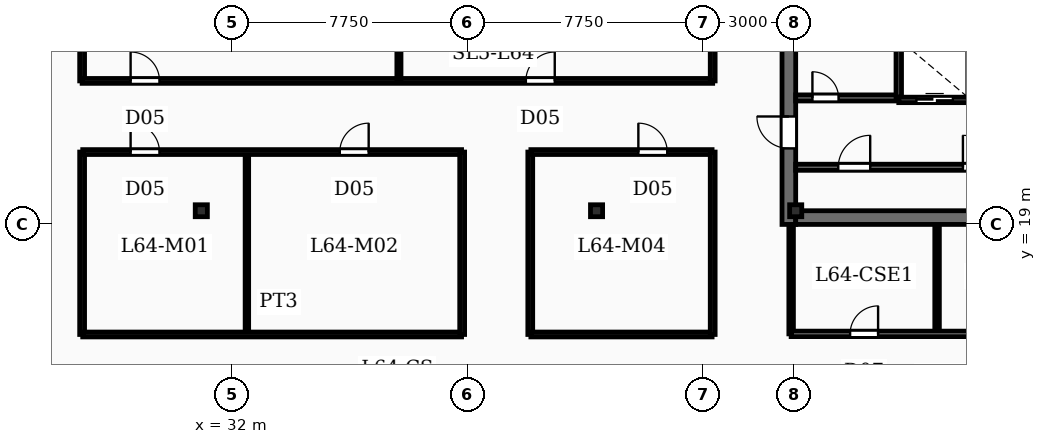
"""IFC4 building model, lengths in metres.
Left out: names, types, materials, properties, quantities, classifications, styles, units other than length and angle.
Written with IfcOpenShell. Run it as: python <this file> out.ifc"""

import sys

from ifc_helpers import new_model, si_unit, direction, frame, frame_2d, origin, origin_2d, place, context, subcontext, project, spatial, rectangle, i_section, extrude, element, fill, save


model = new_model("IFC4")
c1 = context("Model", 3, precision=1e-05, world=origin(), true_north=direction((0.0, 1.0)))
c2 = subcontext(c1, "Body", "Model", "MODEL_VIEW")
j1 = project(units=[si_unit("LENGTHUNIT", "METRE"), si_unit("PLANEANGLEUNIT", "RADIAN")], contexts=[c1])
p1 = place(None, origin())
s1 = spatial("IfcSite", under=j1, at=p1, CompositionType="ELEMENT")
p2 = place(p1, origin())
s2 = spatial("IfcBuilding", under=s1, at=p2, CompositionType="ELEMENT")
p3 = place(p2, frame((0.0, 0.0, 262.2)))
s3 = spatial("IfcBuildingStorey", under=s2, at=p3, CompositionType="ELEMENT", Elevation=262.2)
p4 = place(p3, frame((50.325, 19.0, -0.27), z_axis=(0.0, 0.0, 1.0), x_axis=(0.0, 1.0, 0.0)))
e1 = element("IfcWall", 1, at=p4, inside=s3, PredefinedType="SHEAR", context=c2, shape_type="SweptSolid", body=[
    extrude(rectangle(XDim=20.8, YDim=0.45, at=frame_2d((10.4, 0.0))), origin(), (0.0, 0.0, 1.0), 3.75),
])
p5 = place(p4, frame((2.5, 0.0, 0.27)))
e2 = element("IfcOpeningElement", 2, at=p5, cuts=e1, PredefinedType="OPENING", context=c2, shape_type="SweptSolid", body=[
    extrude(rectangle(XDim=1.05, YDim=2.15, at=frame_2d((0.525, 1.075))), frame((0.0, 0.235, 0.0), z_axis=(0.0, -1.0, 0.0), x_axis=(1.0, 0.0, 0.0)), (0.0, 0.0, 1.0), 0.47),
])
p6 = place(p4, frame((8.65, 0.0, 0.27)))
e3 = element("IfcOpeningElement", 3, at=p6, cuts=e1, PredefinedType="OPENING", context=c2, shape_type="SweptSolid", body=[
    extrude(rectangle(XDim=1.05, YDim=2.15, at=frame_2d((0.525, 1.075))), frame((0.0, 0.235, 0.0), z_axis=(0.0, -1.0, 0.0), x_axis=(1.0, 0.0, 0.0)), (0.0, 0.0, 1.0), 0.47),
])
p7 = place(p4, frame((14.62, 0.0, 0.27)))
e4 = element("IfcOpeningElement", 4, at=p7, cuts=e1, PredefinedType="OPENING", context=c2, shape_type="SweptSolid", body=[
    extrude(rectangle(XDim=1.1, YDim=2.15, at=frame_2d((0.55, 1.075))), frame((0.0, 0.235, 0.0), z_axis=(0.0, -1.0, 0.0), x_axis=(1.0, 0.0, 0.0)), (0.0, 0.0, 1.0), 0.47),
])
p8 = place(p3, frame((50.55, 19.225, -0.27), z_axis=(0.0, 0.0, 1.0), x_axis=(1.0, 0.0, 0.0)))
e5 = element("IfcWall", 5, at=p8, inside=s3, PredefinedType="SHEAR", context=c2, shape_type="SweptSolid", body=[
    extrude(rectangle(XDim=9.8, YDim=0.45, at=frame_2d((4.9, 0.0))), origin(), (0.0, 0.0, 1.0), 3.75),
])
for number, where, z_axis, x_axis in (
    (6, (50.55, 19.45, -0.27), (0.0, 0.0, 1.0), (1.0, 0.0, 0.0)),
    (7, (31.0, 19.45, -0.27), (0.0, 0.0, 1.0), (1.0, 0.0, 0.0)),
    (8, (44.0, 19.45, -0.27), (0.0, 0.0, 1.0), (1.0, 0.0, 0.0)),
):
    element("IfcColumn", number, at=place(p3, frame(where, z_axis=z_axis, x_axis=x_axis)), inside=s3, PredefinedType="COLUMN", context=c2, shape_type="SweptSolid", body=[
        extrude(i_section(OverallWidth=0.399, OverallDepth=0.393, WebThickness=0.023, FlangeThickness=0.037, FilletRadius=0.02, at=origin_2d()), origin(), (0.0, 0.0, 1.0), 3.75),
    ])
p9 = place(p3, frame((53.94, 23.095, 0.0), z_axis=(0.0, 0.0, 1.0), x_axis=(1.0, 0.0, 0.0)))
e9 = element("IfcWall", 9, at=p9, inside=s3, PredefinedType="SOLIDWALL", context=c2, shape_type="SweptSolid", body=[
    extrude(rectangle(XDim=2.5, YDim=0.18, at=frame_2d((1.25, 0.0))), origin(), (0.0, 0.0, 1.0), 3.48),
])
p10 = place(p9, frame((0.58, 0.0, 0.0)))
e10 = element("IfcOpeningElement", 10, at=p10, cuts=e9, PredefinedType="OPENING", context=c2, shape_type="SweptSolid", body=[
    extrude(rectangle(XDim=1.2, YDim=2.2, at=frame_2d((0.6, 1.1))), frame((0.0, 0.1, 0.0), z_axis=(0.0, -1.0, 0.0), x_axis=(1.0, 0.0, 0.0)), (0.0, 0.0, 1.0), 0.2),
])
p11 = place(p3, frame((53.94, 23.185, 0.0), z_axis=(0.0, 0.0, 1.0), x_axis=(0.0, 1.0, 0.0)))
e11 = element("IfcWall", 11, at=p11, inside=s3, PredefinedType="SOLIDWALL", context=c2, shape_type="SweptSolid", body=[
    extrude(rectangle(XDim=1.83, YDim=0.18, at=frame_2d((0.915, 0.0))), origin(), (0.0, 0.0, 1.0), 3.48),
])
p12 = place(p3, frame((50.55, 20.88, 0.0), z_axis=(0.0, 0.0, 1.0), x_axis=(1.0, 0.0, 0.0)))
e12 = element("IfcWall", 12, at=p12, inside=s3, PredefinedType="SOLIDWALL", context=c2, shape_type="SweptSolid", body=[
    extrude(rectangle(XDim=9.8, YDim=0.2, at=frame_2d((4.9, 0.0))), origin(), (0.0, 0.0, 1.0), 2.54),
])
p13 = place(p12, frame((1.4, 0.0, 0.0)))
e13 = element("IfcOpeningElement", 13, at=p13, cuts=e12, PredefinedType="OPENING", context=c2, shape_type="SweptSolid", body=[
    extrude(rectangle(XDim=1.05, YDim=2.15, at=frame_2d((0.525, 1.075))), frame((0.0, 0.11, 0.0), z_axis=(0.0, -1.0, 0.0), x_axis=(1.0, 0.0, 0.0)), (0.0, 0.0, 1.0), 0.22),
])
p14 = place(p12, frame((5.5, 0.0, 0.0)))
e14 = element("IfcOpeningElement", 14, at=p14, cuts=e12, PredefinedType="OPENING", context=c2, shape_type="SweptSolid", body=[
    extrude(rectangle(XDim=1.05, YDim=2.15, at=frame_2d((0.525, 1.075))), frame((0.0, 0.11, 0.0), z_axis=(0.0, -1.0, 0.0), x_axis=(1.0, 0.0, 0.0)), (0.0, 0.0, 1.0), 0.22),
])
p15 = place(p3, frame((50.55, 23.16, 0.0), z_axis=(0.0, 0.0, 1.0), x_axis=(1.0, 0.0, 0.0)))
e15 = element("IfcWall", 15, at=p15, inside=s3, PredefinedType="SOLIDWALL", context=c2, shape_type="SweptSolid", body=[
    extrude(rectangle(XDim=3.33, YDim=0.2, at=frame_2d((1.665, 0.0))), origin(), (0.0, 0.0, 1.0), 2.54),
])
p16 = place(p15, frame((0.55, 0.0, 0.0)))
e16 = element("IfcOpeningElement", 16, at=p16, cuts=e15, PredefinedType="OPENING", context=c2, shape_type="SweptSolid", body=[
    extrude(rectangle(XDim=0.86, YDim=2.05, at=frame_2d((0.43, 1.025))), frame((0.0, 0.11, 0.0), z_axis=(0.0, -1.0, 0.0), x_axis=(1.0, 0.0, 0.0)), (0.0, 0.0, 1.0), 0.22),
])
p17 = place(p3, frame((55.2, 15.4, 0.0), z_axis=(0.0, 0.0, 1.0), x_axis=(0.0, 1.0, 0.0)))
e17 = element("IfcWall", 17, at=p17, inside=s3, PredefinedType="PARTITIONING", context=c2, shape_type="SweptSolid", body=[
    extrude(rectangle(XDim=3.58, YDim=0.15, at=frame_2d((1.79, 0.0))), origin(), (0.0, 0.0, 1.0), 2.54),
])
p18 = place(p3, frame((50.4, 15.4, 0.0), z_axis=(0.0, 0.0, 1.0), x_axis=(1.0, 0.0, 0.0)))
e18 = element("IfcWall", 18, at=p18, inside=s3, PredefinedType="SOLIDWALL", context=c2, shape_type="SweptSolid", body=[
    extrude(rectangle(XDim=10.0, YDim=0.18, at=frame_2d((5.0, 0.0))), origin(), (0.0, 0.0, 1.0), 2.54),
])
p19 = place(p18, frame((1.94, 0.0, 0.0)))
e19 = element("IfcOpeningElement", 19, at=p19, cuts=e18, PredefinedType="OPENING", context=c2, shape_type="SweptSolid", body=[
    extrude(rectangle(XDim=0.92, YDim=2.1, at=frame_2d((0.46, 1.05))), frame((0.0, 0.1, 0.0), z_axis=(0.0, -1.0, 0.0), x_axis=(1.0, 0.0, 0.0)), (0.0, 0.0, 1.0), 0.2),
])
p20 = place(p18, frame((6.97, 0.0, 0.0)))
e20 = element("IfcOpeningElement", 20, at=p20, cuts=e18, PredefinedType="OPENING", context=c2, shape_type="SweptSolid", body=[
    extrude(rectangle(XDim=0.86, YDim=2.05, at=frame_2d((0.43, 1.025))), frame((0.0, 0.1, 0.0), z_axis=(0.0, -1.0, 0.0), x_axis=(1.0, 0.0, 0.0)), (0.0, 0.0, 1.0), 0.2),
])
p21 = place(p3, frame((50.4, 15.4, 0.0), z_axis=(0.0, 0.0, 1.0), x_axis=(0.0, 1.0, 0.0)))
e21 = element("IfcWall", 21, at=p21, inside=s3, PredefinedType="PARTITIONING", context=c2, shape_type="SweptSolid", body=[
    extrude(rectangle(XDim=3.58, YDim=0.15, at=frame_2d((1.79, 0.0))), origin(), (0.0, 0.0, 1.0), 2.54),
])
p22 = place(p3, frame((37.5, 23.72, 0.0), z_axis=(0.0, 0.0, 1.0), x_axis=(0.0, 1.0, 0.0)))
e22 = element("IfcWall", 22, at=p22, inside=s3, PredefinedType="PARTITIONING", context=c2, shape_type="SweptSolid", body=[
    extrude(rectangle(XDim=24.03, YDim=0.135, at=frame_2d((12.015, 0.0))), origin(), (0.0, 0.0, 1.0), 2.54),
])
p23 = place(p3, frame((27.08, 23.72, 0.0), z_axis=(0.0, 0.0, 1.0), x_axis=(1.0, 0.0, 0.0)))
e23 = element("IfcWall", 23, at=p23, inside=s3, PredefinedType="PARTITIONING", context=c2, shape_type="SweptSolid", body=[
    extrude(rectangle(XDim=20.74, YDim=0.16, at=frame_2d((10.37, 0.0))), origin(), (0.0, 0.0, 1.0), 2.54),
])
p24 = place(p23, frame((1.595, 0.0, 0.0)))
e24 = element("IfcOpeningElement", 24, at=p24, cuts=e23, PredefinedType="OPENING", context=c2, shape_type="SweptSolid", body=[
    extrude(rectangle(XDim=0.95, YDim=2.15, at=frame_2d((0.475, 1.075))), frame((0.0, 0.09, 0.0), z_axis=(0.0, -1.0, 0.0), x_axis=(1.0, 0.0, 0.0)), (0.0, 0.0, 1.0), 0.18),
])
p25 = place(p23, frame((14.595, 0.0, 0.0)))
e25 = element("IfcOpeningElement", 25, at=p25, cuts=e23, PredefinedType="OPENING", context=c2, shape_type="SweptSolid", body=[
    extrude(rectangle(XDim=0.95, YDim=2.15, at=frame_2d((0.475, 1.075))), frame((0.0, 0.09, 0.0), z_axis=(0.0, -1.0, 0.0), x_axis=(1.0, 0.0, 0.0)), (0.0, 0.0, 1.0), 0.18),
])
p26 = place(p3, frame((27.08, 23.72, 0.0), z_axis=(0.0, 0.0, 1.0), x_axis=(0.0, 1.0, 0.0)))
e26 = element("IfcWall", 26, at=p26, inside=s3, PredefinedType="PARTITIONING", context=c2, shape_type="SweptSolid", body=[
    extrude(rectangle(XDim=10.66, YDim=0.16, at=frame_2d((5.33, 0.0))), origin(), (0.0, 0.0, 1.0), 2.54),
])
p27 = place(p3, frame((32.5, 15.38, 0.0), z_axis=(0.0, 0.0, 1.0), x_axis=(0.0, 1.0, 0.0)))
e27 = element("IfcWall", 27, at=p27, inside=s3, PredefinedType="PARTITIONING", context=c2, shape_type="SweptSolid", body=[
    extrude(rectangle(XDim=6.0, YDim=0.115, at=frame_2d((3.0, 0.0))), origin(), (0.0, 0.0, 1.0), 2.54),
])
p28 = place(p3, frame((27.1, 21.38, 0.0), z_axis=(0.0, 0.0, 1.0), x_axis=(1.0, 0.0, 0.0)))
e28 = element("IfcWall", 28, at=p28, inside=s3, PredefinedType="PARTITIONING", context=c2, shape_type="SweptSolid", body=[
    extrude(rectangle(XDim=12.46, YDim=0.16, at=frame_2d((6.23, 0.0))), origin(), (0.0, 0.0, 1.0), 2.54),
])
p29 = place(p28, frame((1.575, 0.0, 0.0)))
e29 = element("IfcOpeningElement", 29, at=p29, cuts=e28, PredefinedType="OPENING", context=c2, shape_type="SweptSolid", body=[
    extrude(rectangle(XDim=0.95, YDim=2.15, at=frame_2d((0.475, 1.075))), frame((0.0, 0.09, 0.0), z_axis=(0.0, -1.0, 0.0), x_axis=(1.0, 0.0, 0.0)), (0.0, 0.0, 1.0), 0.18),
])
p30 = place(p28, frame((8.455, 0.0, 0.0)))
e30 = element("IfcOpeningElement", 30, at=p30, cuts=e28, PredefinedType="OPENING", context=c2, shape_type="SweptSolid", body=[
    extrude(rectangle(XDim=0.95, YDim=2.15, at=frame_2d((0.475, 1.075))), frame((0.0, 0.09, 0.0), z_axis=(0.0, -1.0, 0.0), x_axis=(1.0, 0.0, 0.0)), (0.0, 0.0, 1.0), 0.18),
])
p31 = place(p3, frame((27.1, 15.38, 0.0), z_axis=(0.0, 0.0, 1.0), x_axis=(1.0, 0.0, 0.0)))
e31 = element("IfcWall", 31, at=p31, inside=s3, PredefinedType="PARTITIONING", context=c2, shape_type="SweptSolid", body=[
    extrude(rectangle(XDim=12.46, YDim=0.16, at=frame_2d((6.23, 0.0))), origin(), (0.0, 0.0, 1.0), 2.54),
])
p32 = place(p3, frame((41.84, 21.38, 0.0), z_axis=(0.0, 0.0, 1.0), x_axis=(1.0, 0.0, 0.0)))
e32 = element("IfcWall", 32, at=p32, inside=s3, PredefinedType="PARTITIONING", context=c2, shape_type="SweptSolid", body=[
    extrude(rectangle(XDim=5.96, YDim=0.16, at=frame_2d((2.98, 0.0))), origin(), (0.0, 0.0, 1.0), 2.54),
])
p33 = place(p32, frame((3.535, 0.0, 0.0)))
e33 = element("IfcOpeningElement", 33, at=p33, cuts=e32, PredefinedType="OPENING", context=c2, shape_type="SweptSolid", body=[
    extrude(rectangle(XDim=0.95, YDim=2.15, at=frame_2d((0.475, 1.075))), frame((0.0, 0.09, 0.0), z_axis=(0.0, -1.0, 0.0), x_axis=(1.0, 0.0, 0.0)), (0.0, 0.0, 1.0), 0.18),
])
p34 = place(p3, frame((41.84, 15.38, 0.0), z_axis=(0.0, 0.0, 1.0), x_axis=(1.0, 0.0, 0.0)))
e34 = element("IfcWall", 34, at=p34, inside=s3, PredefinedType="PARTITIONING", context=c2, shape_type="SweptSolid", body=[
    extrude(rectangle(XDim=5.96, YDim=0.16, at=frame_2d((2.98, 0.0))), origin(), (0.0, 0.0, 1.0), 2.54),
])
for number, where, z_axis, x_axis in (
    (35, (39.58, 15.38, 0.0), (0.0, 0.0, 1.0), (0.0, 1.0, 0.0)),
    (36, (41.82, 15.38, 0.0), (0.0, 0.0, 1.0), (0.0, 1.0, 0.0)),
    (37, (27.08, 15.38, 0.0), (0.0, 0.0, 1.0), (0.0, 1.0, 0.0)),
    (38, (47.82, 15.38, 0.0), (0.0, 0.0, 1.0), (0.0, 1.0, 0.0)),
):
    element("IfcWall", number, at=place(p3, frame(where, z_axis=z_axis, x_axis=x_axis)), inside=s3, PredefinedType="PARTITIONING", context=c2, shape_type="SweptSolid", body=[
        extrude(rectangle(XDim=6.0, YDim=0.16, at=frame_2d((3.0, 0.0))), origin(), (0.0, 0.0, 1.0), 2.54),
    ])
p35 = place(p3, frame((47.82, 23.72, 0.0), z_axis=(0.0, 0.0, 1.0), x_axis=(0.0, 1.0, 0.0)))
e39 = element("IfcWall", 39, at=p35, inside=s3, PredefinedType="PARTITIONING", context=c2, shape_type="SweptSolid", body=[
    extrude(rectangle(XDim=12.48, YDim=0.16, at=frame_2d((6.24, 0.0))), origin(), (0.0, 0.0, 1.0), 2.54),
])
p36 = place(p5, origin())
e40 = element("IfcDoor", 40, at=p36, inside=s3, OperationType="SINGLE_SWING_RIGHT", PredefinedType="DOOR", context=c2, shape_type="SweptSolid", body=[
    extrude(rectangle(XDim=1.05, YDim=2.15, at=frame_2d((0.525, 1.075))), frame((0.0, 0.025, 0.0), z_axis=(0.0, -1.0, 0.0), x_axis=(1.0, 0.0, 0.0)), (0.0, 0.0, 1.0), 0.05),
])
fill(e2, e40)
p37 = place(p10, origin())
e41 = element("IfcDoor", 41, at=p37, inside=s3, OperationType="DOUBLE_DOOR_SLIDING", PredefinedType="DOOR", context=c2, shape_type="SweptSolid", body=[
    extrude(rectangle(XDim=1.2, YDim=2.2, at=frame_2d((0.6, 1.1))), frame((0.0, 0.025, 0.0), z_axis=(0.0, -1.0, 0.0), x_axis=(1.0, 0.0, 0.0)), (0.0, 0.0, 1.0), 0.05),
])
fill(e10, e41)
p38 = place(p13, origin())
e42 = element("IfcDoor", 42, at=p38, inside=s3, OperationType="SINGLE_SWING_RIGHT", PredefinedType="DOOR", context=c2, shape_type="SweptSolid", body=[
    extrude(rectangle(XDim=1.05, YDim=2.15, at=frame_2d((0.525, 1.075))), frame((0.0, 0.025, 0.0), z_axis=(0.0, -1.0, 0.0), x_axis=(1.0, 0.0, 0.0)), (0.0, 0.0, 1.0), 0.05),
])
fill(e13, e42)
p39 = place(p14, origin())
e43 = element("IfcDoor", 43, at=p39, inside=s3, OperationType="SINGLE_SWING_LEFT", PredefinedType="DOOR", context=c2, shape_type="SweptSolid", body=[
    extrude(rectangle(XDim=1.05, YDim=2.15, at=frame_2d((0.525, 1.075))), frame((0.0, 0.025, 0.0), z_axis=(0.0, -1.0, 0.0), x_axis=(1.0, 0.0, 0.0)), (0.0, 0.0, 1.0), 0.05),
])
fill(e14, e43)
p40 = place(p16, origin())
e44 = element("IfcDoor", 44, at=p40, inside=s3, OperationType="SINGLE_SWING_LEFT", PredefinedType="DOOR", context=c2, shape_type="SweptSolid", body=[
    extrude(rectangle(XDim=0.86, YDim=2.05, at=frame_2d((0.43, 1.025))), frame((0.0, 0.025, 0.0), z_axis=(0.0, -1.0, 0.0), x_axis=(1.0, 0.0, 0.0)), (0.0, 0.0, 1.0), 0.05),
])
fill(e16, e44)
p41 = place(p19, origin())
e45 = element("IfcDoor", 45, at=p41, inside=s3, OperationType="SINGLE_SWING_RIGHT", PredefinedType="DOOR", context=c2, shape_type="SweptSolid", body=[
    extrude(rectangle(XDim=0.92, YDim=2.1, at=frame_2d((0.46, 1.05))), frame((0.0, 0.025, 0.0), z_axis=(0.0, -1.0, 0.0), x_axis=(1.0, 0.0, 0.0)), (0.0, 0.0, 1.0), 0.05),
])
fill(e19, e45)
p42 = place(p24, origin())
e46 = element("IfcDoor", 46, at=p42, inside=s3, OperationType="SINGLE_SWING_LEFT", PredefinedType="DOOR", context=c2, shape_type="SweptSolid", body=[
    extrude(rectangle(XDim=0.95, YDim=2.15, at=frame_2d((0.475, 1.075))), frame((0.0, 0.025, 0.0), z_axis=(0.0, -1.0, 0.0), x_axis=(1.0, 0.0, 0.0)), (0.0, 0.0, 1.0), 0.05),
])
fill(e24, e46)
p43 = place(p25, origin())
e47 = element("IfcDoor", 47, at=p43, inside=s3, OperationType="SINGLE_SWING_RIGHT", PredefinedType="DOOR", context=c2, shape_type="SweptSolid", body=[
    extrude(rectangle(XDim=0.95, YDim=2.15, at=frame_2d((0.475, 1.075))), frame((0.0, 0.025, 0.0), z_axis=(0.0, -1.0, 0.0), x_axis=(1.0, 0.0, 0.0)), (0.0, 0.0, 1.0), 0.05),
])
fill(e25, e47)
p44 = place(p29, origin())
e48 = element("IfcDoor", 48, at=p44, inside=s3, OperationType="SINGLE_SWING_LEFT", PredefinedType="DOOR", context=c2, shape_type="SweptSolid", body=[
    extrude(rectangle(XDim=0.95, YDim=2.15, at=frame_2d((0.475, 1.075))), frame((0.0, 0.025, 0.0), z_axis=(0.0, -1.0, 0.0), x_axis=(1.0, 0.0, 0.0)), (0.0, 0.0, 1.0), 0.05),
])
fill(e29, e48)
p45 = place(p30, origin())
e49 = element("IfcDoor", 49, at=p45, inside=s3, OperationType="SINGLE_SWING_RIGHT", PredefinedType="DOOR", context=c2, shape_type="SweptSolid", body=[
    extrude(rectangle(XDim=0.95, YDim=2.15, at=frame_2d((0.475, 1.075))), frame((0.0, 0.025, 0.0), z_axis=(0.0, -1.0, 0.0), x_axis=(1.0, 0.0, 0.0)), (0.0, 0.0, 1.0), 0.05),
])
fill(e30, e49)
p46 = place(p33, origin())
e50 = element("IfcDoor", 50, at=p46, inside=s3, OperationType="SINGLE_SWING_LEFT", PredefinedType="DOOR", context=c2, shape_type="SweptSolid", body=[
    extrude(rectangle(XDim=0.95, YDim=2.15, at=frame_2d((0.475, 1.075))), frame((0.0, 0.025, 0.0), z_axis=(0.0, -1.0, 0.0), x_axis=(1.0, 0.0, 0.0)), (0.0, 0.0, 1.0), 0.05),
])
fill(e33, e50)
save(model, sys.argv[1])
